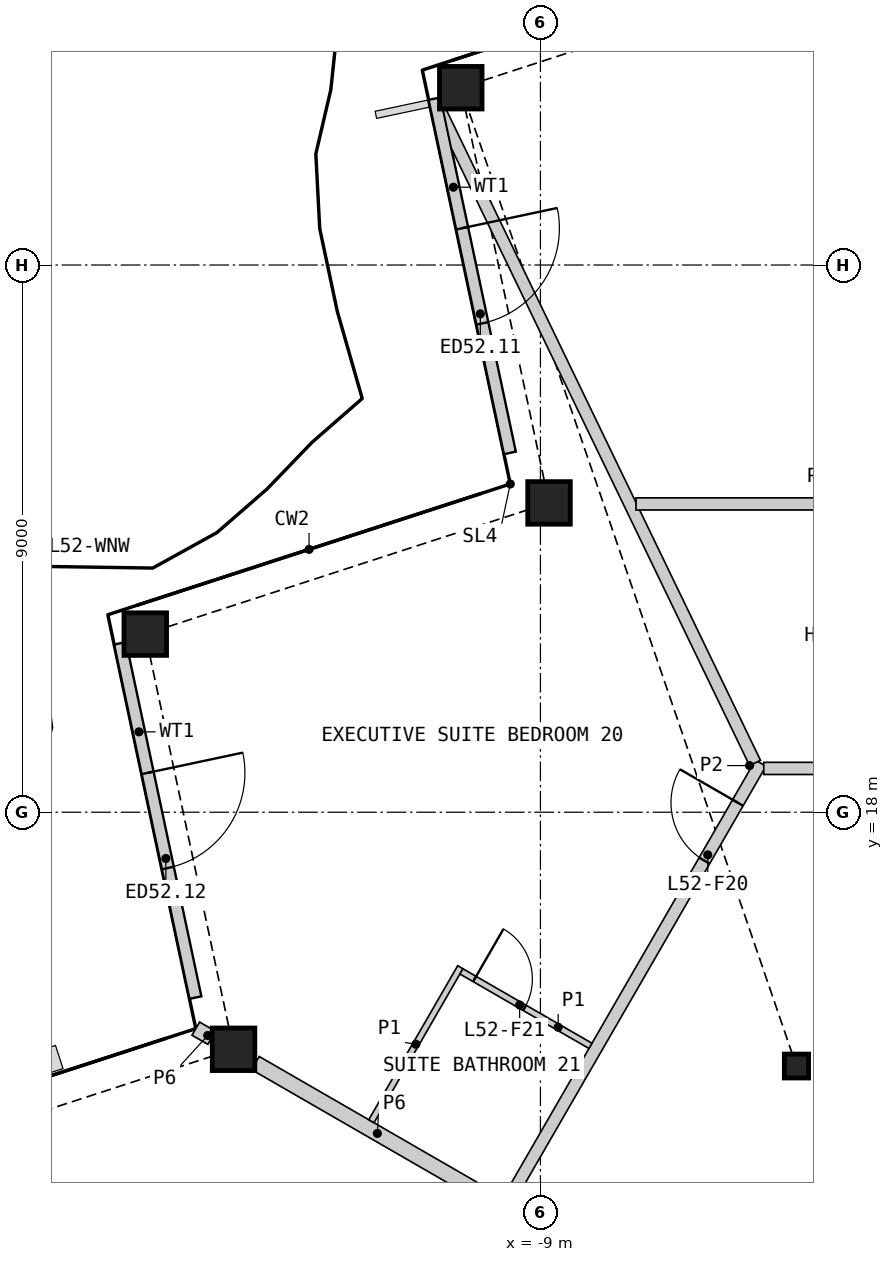
"""IFC4 building model, lengths in metres.
Left out: names, types, materials, properties, quantities, classifications, styles, units other than length and angle.
Written with IfcOpenShell. Run it as: python <this file> out.ifc"""

import sys

from ifc_helpers import new_model, si_unit, direction, frame, frame_2d, origin, origin_2d, place, context, subcontext, project, spatial, polyline, rectangle, hollow_rectangle, i_section, outline, extrude, element, fill, save


model = new_model("IFC4")
c1 = context("Model", 3, precision=1e-05, world=origin(), true_north=direction((0.0, 1.0)))
c2 = subcontext(c1, "Body", "Model", "MODEL_VIEW")
j1 = project(units=[si_unit("LENGTHUNIT", "METRE"), si_unit("PLANEANGLEUNIT", "RADIAN")], contexts=[c1])
p1 = place(None, origin())
s1 = spatial("IfcSite", under=j1, at=p1, CompositionType="ELEMENT")
p2 = place(p1, origin())
s2 = spatial("IfcBuilding", under=s1, at=p2, CompositionType="ELEMENT")
p3 = place(p2, frame((0.0, 0.0, 238.2)))
s3 = spatial("IfcBuildingStorey", under=s2, at=p3, CompositionType="ELEMENT", Elevation=238.2)
for number, where, z_axis, x_axis in (
    (1, (-10.31, 29.916, 0.0), (0.0, 0.0, 1.0), (1.0, 0.0, 0.0)),
    (2, (-8.859, 23.087, 0.0), (0.0, 0.0, 1.0), (1.0, 0.0, 0.0)),
    (3, (-15.499, 20.93, 0.0), (0.0, 0.0, 1.0), (1.0, 0.0, 0.0)),
    (4, (-14.047, 14.101, 0.0), (0.0, 0.0, 1.0), (1.0, 0.0, 0.0)),
):
    element("IfcColumn", number, at=place(p3, frame(where, z_axis=z_axis, x_axis=x_axis)), inside=s3, PredefinedType="COLUMN", context=c2, shape_type="SweptSolid", body=[
        extrude(hollow_rectangle(XDim=0.7, YDim=0.7, WallThickness=0.045, at=origin_2d()), origin(), (0.0, 0.0, 1.0), 3.6),
    ])
p4 = place(p3, frame((-4.789, 13.825, 0.0), z_axis=(0.0, 0.0, 1.0), x_axis=(1.0, 0.0, 0.0)))
e5 = element("IfcColumn", 5, at=p4, inside=s3, PredefinedType="COLUMN", context=c2, shape_type="SweptSolid", body=[
    extrude(i_section(OverallWidth=0.399, OverallDepth=0.393, WebThickness=0.023, FlangeThickness=0.037, at=origin_2d()), origin(), (0.0, 0.0, 1.0), 3.6),
])
p5 = place(p3, frame((-10.741, 29.737, 0.0), z_axis=(0.0, 0.0, 1.0), x_axis=(0.207891593624, -0.978151872308, 0.0)))
e6 = element("IfcWall", 6, at=p5, inside=s3, PredefinedType="SOLIDWALL", context=c2, shape_type="SweptSolid", body=[
    extrude(rectangle(XDim=5.958, YDim=0.2, at=frame_2d((2.979, 0.0))), origin(), (0.0, 0.0, 1.0), 2.701),
])
p6 = place(p5, frame((2.179, 0.0, 0.0)))
e7 = element("IfcOpeningElement", 7, at=p6, cuts=e6, PredefinedType="OPENING", context=c2, shape_type="SweptSolid", body=[
    extrude(rectangle(XDim=1.6, YDim=2.4, at=frame_2d((0.8, 1.2))), frame((0.0, 0.11, 0.0), z_axis=(0.0, -1.0, 0.0), x_axis=(1.0, 0.0, 0.0)), (0.0, 0.0, 1.0), 0.22),
])
p7 = place(p3, frame((-15.913, 20.779, 0.0), z_axis=(0.0, 0.0, 1.0), x_axis=(0.207930802022, -0.978143538327, 0.0)))
e8 = element("IfcWall", 8, at=p7, inside=s3, PredefinedType="SOLIDWALL", context=c2, shape_type="SweptSolid", body=[
    extrude(rectangle(XDim=5.958, YDim=0.2, at=frame_2d((2.979, 0.0))), origin(), (0.0, 0.0, 1.0), 2.701),
])
p8 = place(p7, frame((2.179, 0.0, 0.0)))
e9 = element("IfcOpeningElement", 9, at=p8, cuts=e8, PredefinedType="OPENING", context=c2, shape_type="SweptSolid", body=[
    extrude(rectangle(XDim=1.6, YDim=2.4, at=frame_2d((0.8, 1.2))), frame((0.0, 0.11, 0.0), z_axis=(0.0, -1.0, 0.0), x_axis=(1.0, 0.0, 0.0)), (0.0, 0.0, 1.0), 0.22),
])
p9 = place(p3, frame((-18.976, -4.747, 0.0), z_axis=(0.0, 0.0, 1.0), x_axis=(0.499999852422, 0.866025488988, 0.0)))
e10 = element("IfcWall", 10, at=p9, inside=s3, PredefinedType="PARTITIONING", context=c2, shape_type="SweptSolid", body=[
    extrude(rectangle(XDim=27.198, YDim=0.2, at=frame_2d((13.599, 0.0))), origin(), (0.0, 0.0, 1.0), 3.25),
])
p10 = place(p9, frame((25.346, 0.0, 0.0)))
e11 = element("IfcOpeningElement", 11, at=p10, cuts=e10, PredefinedType="OPENING", context=c2, shape_type="SweptSolid", body=[
    extrude(rectangle(XDim=1.1, YDim=2.1, at=frame_2d((0.55, 1.05))), frame((0.0, 0.11, 0.0), z_axis=(0.0, -1.0, 0.0), x_axis=(1.0, 0.0, 0.0)), (0.0, 0.0, 1.0), 0.22),
])
p11 = place(p9, frame((16.713, 0.0, 0.0)))
e12 = element("IfcOpeningElement", 12, at=p11, cuts=e10, PredefinedType="OPENING", context=c2, shape_type="SweptSolid", body=[
    extrude(rectangle(XDim=1.1, YDim=2.1, at=frame_2d((0.55, 1.05))), frame((0.0, 0.11, 0.0), z_axis=(0.0, -1.0, 0.0), x_axis=(1.0, 0.0, 0.0)), (0.0, 0.0, 1.0), 0.22),
])
p12 = place(p9, frame((0.35, 0.0, 0.0)))
e13 = element("IfcOpeningElement", 13, at=p12, cuts=e10, PredefinedType="OPENING", context=c2, shape_type="SweptSolid", body=[
    extrude(rectangle(XDim=1.1, YDim=2.1, at=frame_2d((0.55, 1.05))), frame((0.0, 0.11, 0.0), z_axis=(0.0, -1.0, 0.0), x_axis=(1.0, 0.0, 0.0)), (0.0, 0.0, 1.0), 0.22),
])
p13 = place(p3, frame((-13.687, 13.874, 0.0), z_axis=(0.0, 0.0, 1.0), x_axis=(0.866034555462, -0.499984148495, 0.0)))
e14 = element("IfcWall", 14, at=p13, inside=s3, PredefinedType="PARTITIONING", context=c2, shape_type="SweptSolid", body=[
    extrude(rectangle(XDim=4.63, YDim=0.25, at=frame_2d((2.315, 0.0))), origin(), (0.0, 0.0, 1.0), 2.404),
])
p14 = place(p3, frame((-5.327, 18.72, 0.0), z_axis=(0.0, 0.0, 1.0), x_axis=(1.0, 0.0, 0.0)))
e15 = element("IfcWall", 15, at=p14, inside=s3, PredefinedType="PARTITIONING", context=c2, shape_type="SweptSolid", body=[
    extrude(rectangle(XDim=3.002, YDim=0.2, at=frame_2d((1.501, 0.0))), origin(), (0.0, 0.0, 1.0), 3.25),
])
p15 = place(p3, frame((-14.668, 14.44, 0.0), z_axis=(0.0, 0.0, 1.0), x_axis=(0.865888485494, -0.500237074485, 0.0)))
e16 = element("IfcWall", 16, at=p15, inside=s3, PredefinedType="PARTITIONING", context=c2, shape_type="SweptSolid", body=[
    extrude(rectangle(XDim=0.301, YDim=0.25, at=frame_2d((0.15, 0.0))), origin(), (0.0, 0.0, 1.0), 2.404),
])
p16 = place(p3, origin())
e17 = element("IfcWall", 17, at=p16, inside=s3, PredefinedType="PARTITIONING", context=c2, shape_type="SweptSolid", body=[
    extrude(outline(polyline([(-5.561, 18.767), (-10.466, 28.923), (-10.64, 29.745), (-5.381, 18.854), (-5.561, 18.767)])), origin(), (0.0, 0.0, 1.0), 2.404),
])
p17 = place(p3, frame((-7.428, 23.071, 0.0), z_axis=(0.0, 0.0, 1.0), x_axis=(1.0, 0.0, 0.0)))
e18 = element("IfcWall", 18, at=p17, inside=s3, PredefinedType="PARTITIONING", context=c2, shape_type="SweptSolid", body=[
    extrude(rectangle(XDim=12.002, YDim=0.2, at=frame_2d((6.001, 0.0))), origin(), (0.0, 0.0, 1.0), 2.404),
])
p18 = place(p17, frame((5.275, 0.0, 0.0)))
e19 = element("IfcOpeningElement", 19, at=p18, cuts=e18, PredefinedType="OPENING", context=c2, shape_type="SweptSolid", body=[
    extrude(rectangle(XDim=0.95, YDim=2.1, at=frame_2d((0.475, 1.05))), frame((0.0, 0.11, 0.0), z_axis=(0.0, -1.0, 0.0), x_axis=(1.0, 0.0, 0.0)), (0.0, 0.0, 1.0), 0.22),
])
p19 = place(p3, frame((-11.78, 12.917, 0.0), z_axis=(0.0, 0.0, 1.0), x_axis=(0.499999433879, 0.866025730634, 0.0)))
e20 = element("IfcWall", 20, at=p19, inside=s3, PredefinedType="PARTITIONING", context=c2, shape_type="SweptSolid", body=[
    extrude(rectangle(XDim=2.925, YDim=0.1, at=frame_2d((1.462, 0.0))), origin(), (0.0, 0.0, 1.0), 2.404),
])
p20 = place(p3, frame((-10.299, 15.382, 0.0), z_axis=(0.0, 0.0, 1.0), x_axis=(0.866057815567, -0.499943856944, 0.0)))
e21 = element("IfcWall", 21, at=p20, inside=s3, PredefinedType="PARTITIONING", context=c2, shape_type="SweptSolid", body=[
    extrude(rectangle(XDim=2.45, YDim=0.1, at=frame_2d((1.225, 0.0))), origin(), (0.0, 0.0, 1.0), 2.404),
])
p21 = place(p20, frame((0.25, 0.0, 0.0)))
e22 = element("IfcOpeningElement", 22, at=p21, cuts=e21, PredefinedType="OPENING", context=c2, shape_type="SweptSolid", body=[
    extrude(rectangle(XDim=0.95, YDim=2.1, at=frame_2d((0.475, 1.05))), frame((0.0, 0.06, 0.0), z_axis=(0.0, -1.0, 0.0), x_axis=(1.0, 0.0, 0.0)), (0.0, 0.0, 1.0), 0.12),
])
p22 = place(p6, origin())
e23 = element("IfcDoor", 23, at=p22, inside=s3, OperationType="DOUBLE_DOOR_SINGLE_SWING", PredefinedType="DOOR", context=c2, shape_type="SweptSolid", body=[
    extrude(rectangle(XDim=1.6, YDim=2.4, at=frame_2d((0.8, 1.2))), frame((0.0, 0.025, 0.0), z_axis=(0.0, -1.0, 0.0), x_axis=(1.0, 0.0, 0.0)), (0.0, 0.0, 1.0), 0.05),
])
fill(e7, e23)
p23 = place(p8, origin())
e24 = element("IfcDoor", 24, at=p23, inside=s3, OperationType="DOUBLE_DOOR_SINGLE_SWING", PredefinedType="DOOR", context=c2, shape_type="SweptSolid", body=[
    extrude(rectangle(XDim=1.6, YDim=2.4, at=frame_2d((0.8, 1.2))), frame((0.0, 0.025, 0.0), z_axis=(0.0, -1.0, 0.0), x_axis=(1.0, 0.0, 0.0)), (0.0, 0.0, 1.0), 0.05),
])
fill(e9, e24)
p24 = place(p10, origin())
e25 = element("IfcDoor", 25, at=p24, inside=s3, OperationType="SINGLE_SWING_RIGHT", PredefinedType="DOOR", context=c2, shape_type="SweptSolid", body=[
    extrude(rectangle(XDim=1.1, YDim=2.1, at=frame_2d((0.55, 1.05))), frame((0.0, 0.025, 0.0), z_axis=(0.0, -1.0, 0.0), x_axis=(1.0, 0.0, 0.0)), (0.0, 0.0, 1.0), 0.05),
])
fill(e11, e25)
p25 = place(p21, origin())
e26 = element("IfcDoor", 26, at=p25, inside=s3, OperationType="SINGLE_SWING_LEFT", PredefinedType="DOOR", context=c2, shape_type="SweptSolid", body=[
    extrude(rectangle(XDim=0.95, YDim=2.1, at=frame_2d((0.475, 1.05))), frame((0.0, 0.025, 0.0), z_axis=(0.0, -1.0, 0.0), x_axis=(1.0, 0.0, 0.0)), (0.0, 0.0, 1.0), 0.05),
])
fill(e22, e26)
save(model, sys.argv[1])
